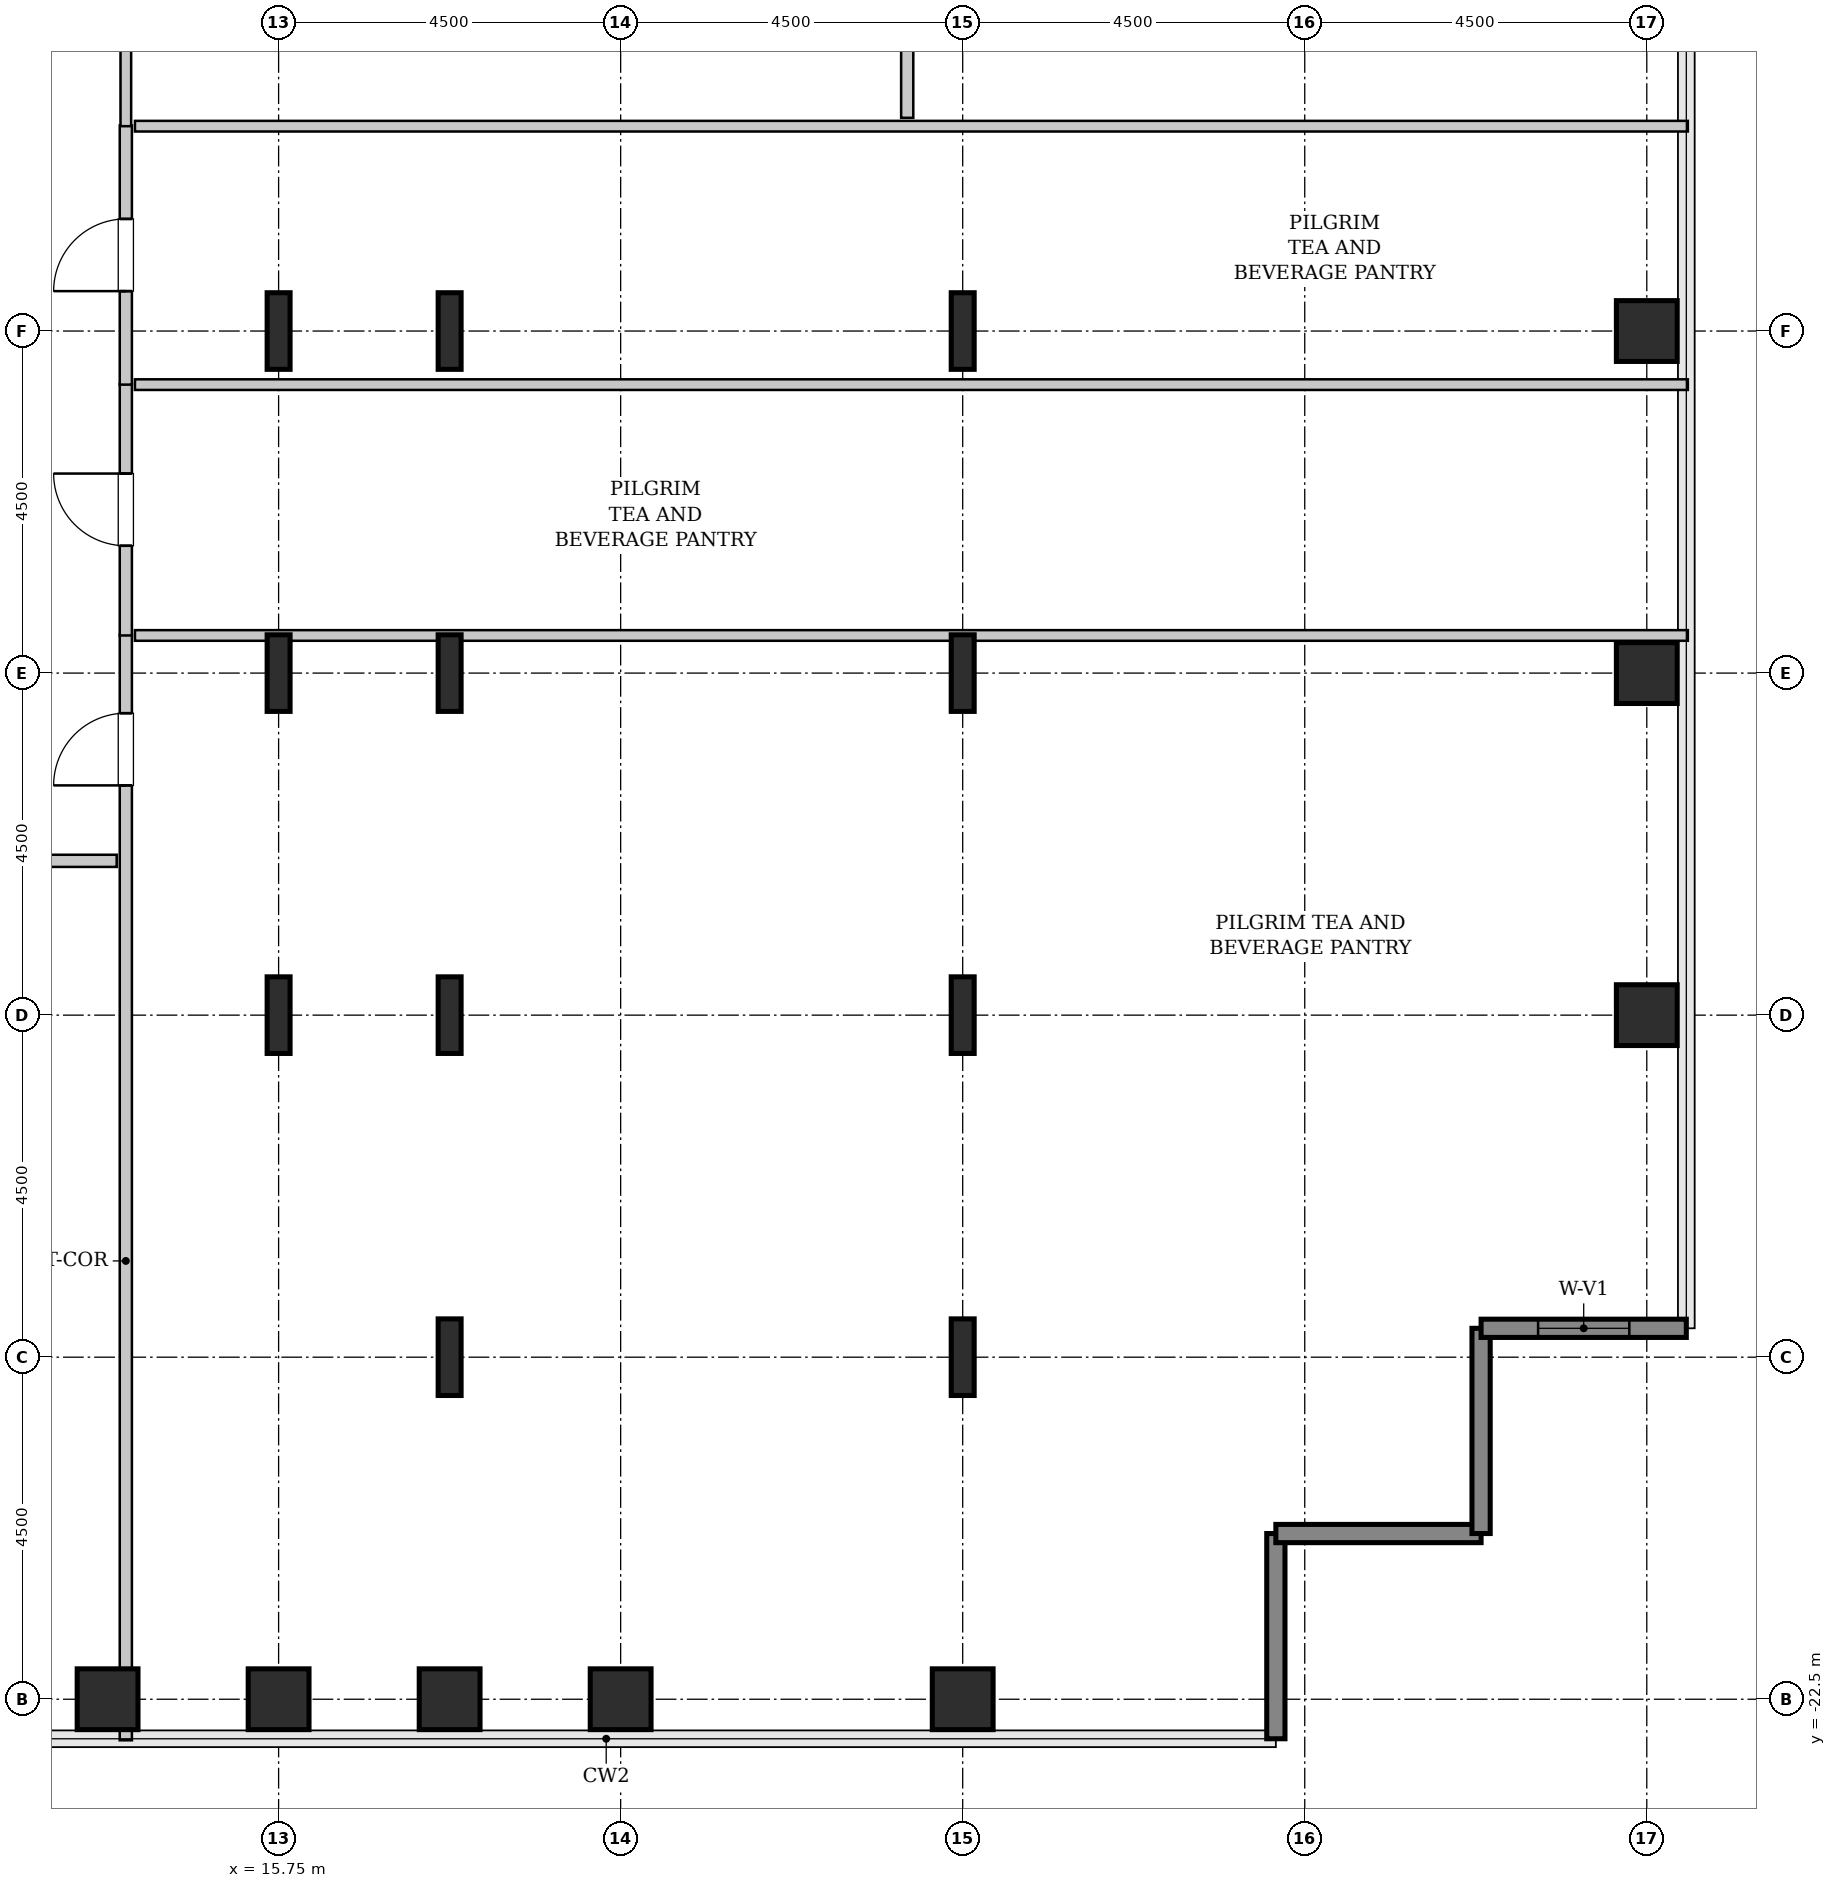
"""IFC4 building model, lengths in metres.
Left out: names, types, materials, properties, quantities, classifications, styles, units other than length and angle.
Written with IfcOpenShell. Run it as: python <this file> out.ifc"""

import sys

from ifc_helpers import new_model, si_unit, direction, frame, frame_2d, origin, origin_2d, place, context, subcontext, project, spatial, rectangle, hollow_rectangle, i_section, extrude, source, transform, mapped, element, fill, save


model = new_model("IFC4")
c1 = context("Model", 3, precision=1e-05, world=origin(), true_north=direction((0.0, 1.0)))
c2 = subcontext(c1, "Body", "Model", "MODEL_VIEW")
j1 = project(units=[si_unit("LENGTHUNIT", "METRE"), si_unit("PLANEANGLEUNIT", "RADIAN")], contexts=[c1])
p1 = place(None, origin())
s1 = spatial("IfcSite", under=j1, at=p1, CompositionType="ELEMENT")
p2 = place(p1, origin())
s2 = spatial("IfcBuilding", under=s1, at=p2, CompositionType="ELEMENT")
p3 = place(p2, frame((0.0, 0.0, 140.2)))
s3 = spatial("IfcBuildingStorey", under=s2, at=p3, CompositionType="ELEMENT", Elevation=140.2)
m1 = source(origin(), c2, "Body", "SweptSolid", [
    extrude(hollow_rectangle(XDim=0.8, YDim=0.8, WallThickness=0.04, InnerFilletRadius=0.04, OuterFilletRadius=0.08, at=origin_2d()), origin(), (0.0, 0.0, 1.0), 3.8),
])
for number, where, z_axis, x_axis in (
    (1, (13.5, -22.5, 0.0), (0.0, 0.0, 1.0), (1.0, 0.0, 0.0)),
    (2, (15.75, -22.5, 0.0), (0.0, 0.0, 1.0), (1.0, 0.0, 0.0)),
):
    element("IfcColumn", number, at=place(p3, frame(where, z_axis=z_axis, x_axis=x_axis)), inside=s3, PredefinedType="COLUMN", context=c2, shape_type="MappedRepresentation", body=[
        mapped(m1, transform((0.0, 0.0, 0.0), x_axis=(1.0, 0.0, 0.0), y_axis=(0.0, 1.0, 0.0), z_axis=(0.0, 0.0, 1.0), scale=1.0)),
    ])
m2 = source(origin(), c2, "Body", "SweptSolid", [
    extrude(i_section(OverallWidth=0.302, OverallDepth=1.008, WebThickness=0.021, FlangeThickness=0.04, FilletRadius=0.03, at=origin_2d()), origin(), (0.0, 0.0, 1.0), 3.8),
])
for number, where, z_axis, x_axis in (
    (3, (15.75, -13.5, 0.0), (0.0, 0.0, 1.0), (1.0, 0.0, 0.0)),
    (4, (15.75, -9.0, 0.0), (0.0, 0.0, 1.0), (1.0, 0.0, 0.0)),
    (5, (15.75, -4.5, 0.0), (0.0, 0.0, 1.0), (1.0, 0.0, 0.0)),
):
    element("IfcColumn", number, at=place(p3, frame(where, z_axis=z_axis, x_axis=x_axis)), inside=s3, PredefinedType="COLUMN", context=c2, shape_type="MappedRepresentation", body=[
        mapped(m2, transform((0.0, 0.0, 0.0), x_axis=(1.0, 0.0, 0.0), y_axis=(0.0, 1.0, 0.0), z_axis=(0.0, 0.0, 1.0), scale=1.0)),
    ])
p4 = place(p3, frame((18.0, -22.5, 0.0), z_axis=(0.0, 0.0, 1.0), x_axis=(1.0, 0.0, 0.0)))
e6 = element("IfcColumn", 6, at=p4, inside=s3, PredefinedType="COLUMN", context=c2, shape_type="MappedRepresentation", body=[
    mapped(m1, transform((0.0, 0.0, 0.0), x_axis=(1.0, 0.0, 0.0), y_axis=(0.0, 1.0, 0.0), z_axis=(0.0, 0.0, 1.0), scale=1.0)),
])
for number, where, z_axis, x_axis in (
    (7, (18.0, -18.0, 0.0), (0.0, 0.0, 1.0), (1.0, 0.0, 0.0)),
    (8, (18.0, -13.5, 0.0), (0.0, 0.0, 1.0), (1.0, 0.0, 0.0)),
    (9, (18.0, -9.0, 0.0), (0.0, 0.0, 1.0), (1.0, 0.0, 0.0)),
    (10, (18.0, -4.5, 0.0), (0.0, 0.0, 1.0), (1.0, 0.0, 0.0)),
):
    element("IfcColumn", number, at=place(p3, frame(where, z_axis=z_axis, x_axis=x_axis)), inside=s3, PredefinedType="COLUMN", context=c2, shape_type="MappedRepresentation", body=[
        mapped(m2, transform((0.0, 0.0, 0.0), x_axis=(1.0, 0.0, 0.0), y_axis=(0.0, 1.0, 0.0), z_axis=(0.0, 0.0, 1.0), scale=1.0)),
    ])
for number, where, z_axis, x_axis in (
    (11, (20.25, -22.5, 0.0), (0.0, 0.0, 1.0), (1.0, 0.0, 0.0)),
    (12, (24.75, -22.5, 0.0), (0.0, 0.0, 1.0), (1.0, 0.0, 0.0)),
):
    element("IfcColumn", number, at=place(p3, frame(where, z_axis=z_axis, x_axis=x_axis)), inside=s3, PredefinedType="COLUMN", context=c2, shape_type="MappedRepresentation", body=[
        mapped(m1, transform((0.0, 0.0, 0.0), x_axis=(1.0, 0.0, 0.0), y_axis=(0.0, 1.0, 0.0), z_axis=(0.0, 0.0, 1.0), scale=1.0)),
    ])
for number, where, z_axis, x_axis in (
    (13, (24.75, -18.0, 0.0), (0.0, 0.0, 1.0), (1.0, 0.0, 0.0)),
    (14, (24.75, -13.5, 0.0), (0.0, 0.0, 1.0), (1.0, 0.0, 0.0)),
    (15, (24.75, -9.0, 0.0), (0.0, 0.0, 1.0), (1.0, 0.0, 0.0)),
    (16, (24.75, -4.5, 0.0), (0.0, 0.0, 1.0), (1.0, 0.0, 0.0)),
):
    element("IfcColumn", number, at=place(p3, frame(where, z_axis=z_axis, x_axis=x_axis)), inside=s3, PredefinedType="COLUMN", context=c2, shape_type="MappedRepresentation", body=[
        mapped(m2, transform((0.0, 0.0, 0.0), x_axis=(1.0, 0.0, 0.0), y_axis=(0.0, 1.0, 0.0), z_axis=(0.0, 0.0, 1.0), scale=1.0)),
    ])
for number, where, z_axis, x_axis in (
    (17, (33.75, -13.5, 0.0), (0.0, 0.0, 1.0), (1.0, 0.0, 0.0)),
    (18, (33.75, -9.0, 0.0), (0.0, 0.0, 1.0), (1.0, 0.0, 0.0)),
    (19, (33.75, -4.5, 0.0), (0.0, 0.0, 1.0), (1.0, 0.0, 0.0)),
):
    element("IfcColumn", number, at=place(p3, frame(where, z_axis=z_axis, x_axis=x_axis)), inside=s3, PredefinedType="COLUMN", context=c2, shape_type="MappedRepresentation", body=[
        mapped(m1, transform((0.0, 0.0, 0.0), x_axis=(1.0, 0.0, 0.0), y_axis=(0.0, 1.0, 0.0), z_axis=(0.0, 0.0, 1.0), scale=1.0)),
    ])
m3 = source(origin(), c2, "Body", "SweptSolid", [
    extrude(rectangle(XDim=2.7, YDim=0.24, at=frame_2d((1.35, 0.0))), origin(), (0.0, 0.0, 1.0), 3.5),
])
for number, where, z_axis, x_axis in (
    (20, (28.87, -23.02, 0.0), (0.0, 0.0, 1.0), (0.0, 1.0, 0.0)),
    (21, (28.87, -20.32, 0.0), (0.0, 0.0, 1.0), (1.0, 0.0, 0.0)),
    (22, (31.57, -20.32, 0.0), (0.0, 0.0, 1.0), (0.0, 1.0, 0.0)),
):
    element("IfcWall", number, at=place(p3, frame(where, z_axis=z_axis, x_axis=x_axis)), inside=s3, PredefinedType="SHEAR", context=c2, shape_type="MappedRepresentation", body=[
        mapped(m3, transform((0.0, 0.0, 0.0), x_axis=(1.0, 0.0, 0.0), y_axis=(0.0, 1.0, 0.0), z_axis=(0.0, 0.0, 1.0), scale=1.0)),
    ])
p5 = place(p3, frame((31.57, -17.62, 0.0), z_axis=(0.0, 0.0, 1.0), x_axis=(1.0, 0.0, 0.0)))
e23 = element("IfcWall", 23, at=p5, inside=s3, PredefinedType="SHEAR", context=c2, shape_type="MappedRepresentation", body=[
    mapped(m3, transform((0.0, 0.0, 0.0), x_axis=(1.0, 0.0, 0.0), y_axis=(0.0, 1.0, 0.0), z_axis=(0.0, 0.0, 1.0), scale=1.0)),
])
p6 = place(p5, frame((0.75, 0.0, 0.85)))
e24 = element("IfcOpeningElement", 24, at=p6, cuts=e23, PredefinedType="OPENING", context=c2, shape_type="SweptSolid", body=[
    extrude(rectangle(XDim=1.2, YDim=1.8, at=frame_2d((0.6, 0.9))), frame((0.0, 0.13, 0.0), z_axis=(0.0, -1.0, 0.0), x_axis=(1.0, 0.0, 0.0)), (0.0, 0.0, 1.0), 0.26),
])
m4 = source(origin(), c2, "Body", "SweptSolid", [
    extrude(rectangle(XDim=14.545, YDim=0.16, at=frame_2d((7.272, 0.0))), origin(), (0.0, 0.0, 1.0), 3.485),
])
p7 = place(p3, frame((13.74, -23.04, 0.0), z_axis=(0.0, 0.0, 1.0), x_axis=(0.0, 1.0, 0.0)))
e25 = element("IfcWall", 25, at=p7, inside=s3, PredefinedType="PARTITIONING", context=c2, shape_type="MappedRepresentation", body=[
    mapped(m4, transform((0.0, 0.0, 0.0), x_axis=(1.0, 0.0, 0.0), y_axis=(0.0, 1.0, 0.0), z_axis=(0.0, 0.0, 1.0), scale=1.0)),
])
p8 = place(p7, frame((12.562, 0.0, 0.0)))
e26 = element("IfcOpeningElement", 26, at=p8, cuts=e25, PredefinedType="OPENING", context=c2, shape_type="SweptSolid", body=[
    extrude(rectangle(XDim=0.95, YDim=2.1, at=frame_2d((0.475, 1.05))), frame((0.0, 0.09, 0.0), z_axis=(0.0, -1.0, 0.0), x_axis=(1.0, 0.0, 0.0)), (0.0, 0.0, 1.0), 0.18),
])
m5 = source(origin(), c2, "Body", "SweptSolid", [
    extrude(rectangle(XDim=20.43, YDim=0.14, at=frame_2d((10.215, 0.0))), origin(), (0.0, 0.0, 1.0), 2.825),
])
p9 = place(p3, frame((13.86, -8.505, 0.0), z_axis=(0.0, 0.0, 1.0), x_axis=(1.0, 0.0, 0.0)))
e27 = element("IfcWall", 27, at=p9, inside=s3, PredefinedType="PARTITIONING", context=c2, shape_type="MappedRepresentation", body=[
    mapped(m5, transform((0.0, 0.0, 0.0), x_axis=(1.0, 0.0, 0.0), y_axis=(0.0, 1.0, 0.0), z_axis=(0.0, 0.0, 1.0), scale=1.0)),
])
m6 = source(origin(), c2, "Body", "SweptSolid", [
    extrude(rectangle(XDim=3.31, YDim=0.16, at=frame_2d((1.655, 0.0))), origin(), (0.0, 0.0, 1.0), 3.485),
])
p10 = place(p3, frame((13.74, -8.505, 0.0), z_axis=(0.0, 0.0, 1.0), x_axis=(0.0, 1.0, 0.0)))
e28 = element("IfcWall", 28, at=p10, inside=s3, PredefinedType="PARTITIONING", context=c2, shape_type="MappedRepresentation", body=[
    mapped(m6, transform((0.0, 0.0, 0.0), x_axis=(1.0, 0.0, 0.0), y_axis=(0.0, 1.0, 0.0), z_axis=(0.0, 0.0, 1.0), scale=1.0)),
])
p11 = place(p10, frame((1.18, 0.0, 0.0)))
e29 = element("IfcOpeningElement", 29, at=p11, cuts=e28, PredefinedType="OPENING", context=c2, shape_type="SweptSolid", body=[
    extrude(rectangle(XDim=0.95, YDim=2.1, at=frame_2d((0.475, 1.05))), frame((0.0, 0.09, 0.0), z_axis=(0.0, -1.0, 0.0), x_axis=(1.0, 0.0, 0.0)), (0.0, 0.0, 1.0), 0.18),
])
m7 = source(origin(), c2, "Body", "SweptSolid", [
    extrude(rectangle(XDim=20.43, YDim=0.14, at=frame_2d((10.215, 0.0))), origin(), (0.0, 0.0, 1.0), 3.485),
])
p12 = place(p3, frame((13.86, -5.205, 0.0), z_axis=(0.0, 0.0, 1.0), x_axis=(1.0, 0.0, 0.0)))
e30 = element("IfcWall", 30, at=p12, inside=s3, PredefinedType="PARTITIONING", context=c2, shape_type="MappedRepresentation", body=[
    mapped(m7, transform((0.0, 0.0, 0.0), x_axis=(1.0, 0.0, 0.0), y_axis=(0.0, 1.0, 0.0), z_axis=(0.0, 0.0, 1.0), scale=1.0)),
])
m8 = source(origin(), c2, "Body", "SweptSolid", [
    extrude(rectangle(XDim=3.41, YDim=0.16, at=frame_2d((1.705, 0.0))), origin(), (0.0, 0.0, 1.0), 3.485),
])
p13 = place(p3, frame((13.74, -5.205, 0.0), z_axis=(0.0, 0.0, 1.0), x_axis=(0.0, 1.0, 0.0)))
e31 = element("IfcWall", 31, at=p13, inside=s3, PredefinedType="PARTITIONING", context=c2, shape_type="MappedRepresentation", body=[
    mapped(m8, transform((0.0, 0.0, 0.0), x_axis=(1.0, 0.0, 0.0), y_axis=(0.0, 1.0, 0.0), z_axis=(0.0, 0.0, 1.0), scale=1.0)),
])
p14 = place(p13, frame((1.23, 0.0, 0.0)))
e32 = element("IfcOpeningElement", 32, at=p14, cuts=e31, PredefinedType="OPENING", context=c2, shape_type="SweptSolid", body=[
    extrude(rectangle(XDim=0.95, YDim=2.1, at=frame_2d((0.475, 1.05))), frame((0.0, 0.09, 0.0), z_axis=(0.0, -1.0, 0.0), x_axis=(1.0, 0.0, 0.0)), (0.0, 0.0, 1.0), 0.18),
])
p15 = place(p3, frame((13.86, -1.805, 0.0), z_axis=(0.0, 0.0, 1.0), x_axis=(1.0, 0.0, 0.0)))
e33 = element("IfcWall", 33, at=p15, inside=s3, PredefinedType="PARTITIONING", context=c2, shape_type="MappedRepresentation", body=[
    mapped(m7, transform((0.0, 0.0, 0.0), x_axis=(1.0, 0.0, 0.0), y_axis=(0.0, 1.0, 0.0), z_axis=(0.0, 0.0, 1.0), scale=1.0)),
])
m9 = source(origin(), c2, "Body", "SweptSolid", [
    extrude(rectangle(XDim=3.065, YDim=0.14, at=frame_2d((1.532, 0.0))), origin(), (0.0, 0.0, 1.0), 3.485),
])
p16 = place(p3, frame((13.74, -1.805, 0.0), z_axis=(0.0, 0.0, 1.0), x_axis=(0.0, 1.0, 0.0)))
e34 = element("IfcWall", 34, at=p16, inside=s3, PredefinedType="PARTITIONING", context=c2, shape_type="MappedRepresentation", body=[
    mapped(m9, transform((0.0, 0.0, 0.0), x_axis=(1.0, 0.0, 0.0), y_axis=(0.0, 1.0, 0.0), z_axis=(0.0, 0.0, 1.0), scale=1.0)),
])
m10 = source(origin(), c2, "Body", "SweptSolid", [
    extrude(rectangle(XDim=7.3, YDim=0.16, at=frame_2d((3.65, 0.0))), origin(), (0.0, 0.0, 1.0), 3.485),
])
p17 = place(p3, frame((24.02, -1.695, 0.0), z_axis=(0.0, 0.0, 1.0), x_axis=(0.0, 1.0, 0.0)))
e35 = element("IfcWall", 35, at=p17, inside=s3, PredefinedType="PARTITIONING", context=c2, shape_type="MappedRepresentation", body=[
    mapped(m10, transform((0.0, 0.0, 0.0), x_axis=(1.0, 0.0, 0.0), y_axis=(0.0, 1.0, 0.0), z_axis=(0.0, 0.0, 1.0), scale=1.0)),
])
p18 = place(p17, frame((3.47, 0.0, 0.0)))
e36 = element("IfcOpeningElement", 36, at=p18, cuts=e35, PredefinedType="OPENING", context=c2, shape_type="SweptSolid", body=[
    extrude(rectangle(XDim=0.95, YDim=2.1, at=frame_2d((0.475, 1.05))), frame((0.0, 0.09, 0.0), z_axis=(0.0, -1.0, 0.0), x_axis=(1.0, 0.0, 0.0)), (0.0, 0.0, 1.0), 0.18),
])
m11 = source(origin(), c2, "Body", "SweptSolid", [
    extrude(rectangle(XDim=6.825, YDim=0.16, at=frame_2d((3.413, 0.0))), origin(), (0.0, 0.0, 1.0), 3.485),
])
p19 = place(p3, frame((6.795, -11.47, 0.0), z_axis=(0.0, 0.0, 1.0), x_axis=(1.0, 0.0, 0.0)))
e37 = element("IfcWall", 37, at=p19, inside=s3, PredefinedType="PARTITIONING", context=c2, shape_type="MappedRepresentation", body=[
    mapped(m11, transform((0.0, 0.0, 0.0), x_axis=(1.0, 0.0, 0.0), y_axis=(0.0, 1.0, 0.0), z_axis=(0.0, 0.0, 1.0), scale=1.0)),
])
p20 = place(p19, frame((2.938, 0.0, 0.0)))
e38 = element("IfcOpeningElement", 38, at=p20, cuts=e37, PredefinedType="OPENING", context=c2, shape_type="SweptSolid", body=[
    extrude(rectangle(XDim=0.95, YDim=2.1, at=frame_2d((0.475, 1.05))), frame((0.0, 0.09, 0.0), z_axis=(0.0, -1.0, 0.0), x_axis=(1.0, 0.0, 0.0)), (0.0, 0.0, 1.0), 0.18),
])
m12 = source(origin(), c2, "Body", "SweptSolid", [
    extrude(rectangle(XDim=1.2, YDim=1.8, at=frame_2d((0.6, 0.9))), frame((0.0, 0.03, 0.0), z_axis=(0.0, -1.0, 0.0), x_axis=(1.0, 0.0, 0.0)), (0.0, 0.0, 1.0), 0.06),
])
p21 = place(p6, origin())
e39 = element("IfcWindow", 39, at=p21, inside=s3, PartitioningType="SINGLE_PANEL", PredefinedType="WINDOW", context=c2, shape_type="MappedRepresentation", body=[
    mapped(m12, transform((0.0, 0.0, 0.0), x_axis=(1.0, 0.0, 0.0), y_axis=(0.0, 1.0, 0.0), z_axis=(0.0, 0.0, 1.0), scale=1.0)),
])
fill(e24, e39)
m13 = source(origin(), c2, "Body", "SweptSolid", [
    extrude(rectangle(XDim=0.95, YDim=2.1, at=frame_2d((0.475, 1.05))), frame((0.0, 0.025, 0.0), z_axis=(0.0, -1.0, 0.0), x_axis=(1.0, 0.0, 0.0)), (0.0, 0.0, 1.0), 0.05),
])
p22 = place(p8, origin())
e40 = element("IfcDoor", 40, at=p22, inside=s3, OperationType="SINGLE_SWING_LEFT", PredefinedType="DOOR", context=c2, shape_type="MappedRepresentation", body=[
    mapped(m13, transform((0.0, 0.0, 0.0), x_axis=(1.0, 0.0, 0.0), y_axis=(0.0, 1.0, 0.0), z_axis=(0.0, 0.0, 1.0), scale=1.0)),
])
fill(e26, e40)
p23 = place(p11, origin())
e41 = element("IfcDoor", 41, at=p23, inside=s3, OperationType="SINGLE_SWING_RIGHT", PredefinedType="DOOR", context=c2, shape_type="MappedRepresentation", body=[
    mapped(m13, transform((0.0, 0.0, 0.0), x_axis=(1.0, 0.0, 0.0), y_axis=(0.0, 1.0, 0.0), z_axis=(0.0, 0.0, 1.0), scale=1.0)),
])
fill(e29, e41)
p24 = place(p14, origin())
e42 = element("IfcDoor", 42, at=p24, inside=s3, OperationType="SINGLE_SWING_LEFT", PredefinedType="DOOR", context=c2, shape_type="MappedRepresentation", body=[
    mapped(m13, transform((0.0, 0.0, 0.0), x_axis=(1.0, 0.0, 0.0), y_axis=(0.0, 1.0, 0.0), z_axis=(0.0, 0.0, 1.0), scale=1.0)),
])
fill(e32, e42)
save(model, sys.argv[1])
